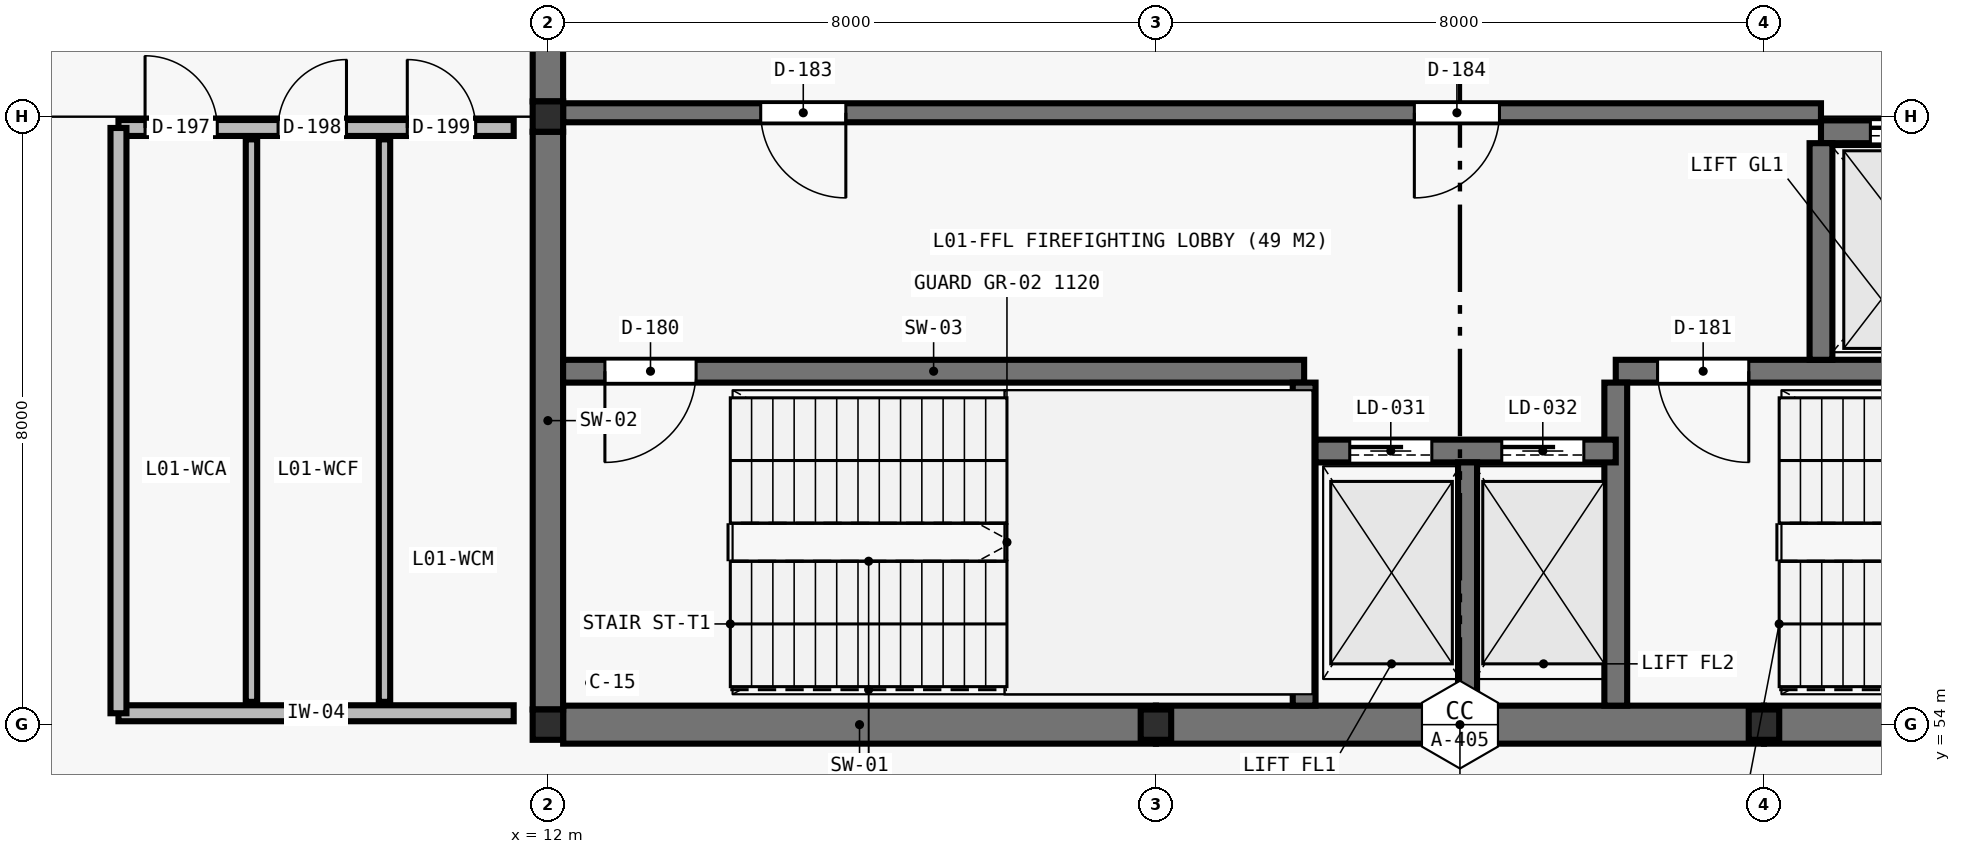
"""IFC4 building model, lengths in metres.
Left out: names, types, materials, properties, quantities, classifications, styles, units other than length and angle.
Written with IfcOpenShell. Run it as: python <this file> out.ifc"""

import sys

from ifc_helpers import new_model, si_unit, direction, frame, frame_2d, origin, origin_2d, place, context, subcontext, project, spatial, rectangle, i_section, extrude, element, fill, save


model = new_model("IFC4")
c1 = context("Model", 3, precision=1e-05, world=origin(), true_north=direction((0.0, 1.0)))
c2 = subcontext(c1, "Body", "Model", "MODEL_VIEW")
j1 = project(units=[si_unit("LENGTHUNIT", "METRE"), si_unit("PLANEANGLEUNIT", "RADIAN")], contexts=[c1])
p1 = place(None, origin())
s1 = spatial("IfcSite", under=j1, at=p1, CompositionType="ELEMENT")
p2 = place(p1, origin())
s2 = spatial("IfcBuilding", under=s1, at=p2, CompositionType="ELEMENT")
p3 = place(p2, frame((0.0, 0.0, 6.3)))
s3 = spatial("IfcBuildingStorey", under=s2, at=p3, CompositionType="ELEMENT", Elevation=6.3)
for number, where, z_axis, x_axis in (
    (1, (12.0, 54.0, 0.0), (0.0, 0.0, 1.0), (1.0, 0.0, 0.0)),
    (2, (12.0, 62.0, 0.0), (0.0, 0.0, 1.0), (1.0, 0.0, 0.0)),
    (3, (20.0, 54.0, 0.0), (0.0, 0.0, 1.0), (1.0, 0.0, 0.0)),
    (4, (28.0, 54.0, 0.0), (0.0, 0.0, 1.0), (1.0, 0.0, 0.0)),
):
    element("IfcColumn", number, at=place(p3, frame(where, z_axis=z_axis, x_axis=x_axis)), inside=s3, PredefinedType="COLUMN", context=c2, shape_type="SweptSolid", body=[
        extrude(i_section(OverallWidth=0.401, OverallDepth=0.399, WebThickness=0.025, FlangeThickness=0.04, at=origin_2d()), origin(), (0.0, 0.0, 1.0), 4.6),
    ])
p4 = place(p3, frame((12.2, 54.0, 0.0), z_axis=(0.0, 0.0, 1.0), x_axis=(1.0, 0.0, 0.0)))
e5 = element("IfcWall", 5, at=p4, inside=s3, PredefinedType="SHEAR", context=c2, shape_type="SweptSolid", body=[
    extrude(rectangle(XDim=7.8, YDim=0.5, at=frame_2d((3.9, 0.0))), origin(), (0.0, 0.0, 1.0), 4.6),
])
p5 = place(p3, frame((20.0, 54.0, 0.0), z_axis=(0.0, 0.0, 1.0), x_axis=(1.0, 0.0, 0.0)))
e6 = element("IfcWall", 6, at=p5, inside=s3, PredefinedType="SHEAR", context=c2, shape_type="SweptSolid", body=[
    extrude(rectangle(XDim=8.0, YDim=0.5, at=frame_2d((4.0, 0.0))), origin(), (0.0, 0.0, 1.0), 4.6),
])
p6 = place(p3, frame((28.0, 54.0, 0.0), z_axis=(0.0, 0.0, 1.0), x_axis=(1.0, 0.0, 0.0)))
e7 = element("IfcWall", 7, at=p6, inside=s3, PredefinedType="SHEAR", context=c2, shape_type="SweptSolid", body=[
    extrude(rectangle(XDim=7.8, YDim=0.5, at=frame_2d((3.9, 0.0))), origin(), (0.0, 0.0, 1.0), 4.6),
])
p7 = place(p3, frame((12.0, 54.199, 0.0), z_axis=(0.0, 0.0, 1.0), x_axis=(0.0, 1.0, 0.0)))
e8 = element("IfcWall", 8, at=p7, inside=s3, PredefinedType="SHEAR", context=c2, shape_type="SweptSolid", body=[
    extrude(rectangle(XDim=7.601, YDim=0.4, at=frame_2d((3.801, 0.0))), origin(), (0.0, 0.0, 1.0), 4.6),
])
p8 = place(p3, frame((12.0, 62.199, 0.0), z_axis=(0.0, 0.0, 1.0), x_axis=(0.0, 1.0, 0.0)))
e9 = element("IfcWall", 9, at=p8, inside=s3, PredefinedType="SHEAR", context=c2, shape_type="SweptSolid", body=[
    extrude(rectangle(XDim=7.601, YDim=0.4, at=frame_2d((3.801, 0.0))), origin(), (0.0, 0.0, 1.0), 4.6),
])
p9 = place(p8, frame((0.7, 0.0, 0.0)))
e10 = element("IfcOpeningElement", 10, at=p9, cuts=e9, PredefinedType="OPENING", context=c2, shape_type="SweptSolid", body=[
    extrude(rectangle(XDim=1.8, YDim=2.2, at=frame_2d((0.9, 1.1))), frame((0.0, 0.21, 0.0), z_axis=(0.0, -1.0, 0.0), x_axis=(1.0, 0.0, 0.0)), (0.0, 0.0, 1.0), 0.42),
])
p10 = place(p3, frame((12.2, 58.65, 0.0), z_axis=(0.0, 0.0, 1.0), x_axis=(1.0, 0.0, 0.0)))
e11 = element("IfcWall", 11, at=p10, inside=s3, PredefinedType="SHEAR", context=c2, shape_type="SweptSolid", body=[
    extrude(rectangle(XDim=9.75, YDim=0.3, at=frame_2d((4.875, 0.0))), origin(), (0.0, 0.0, 1.0), 4.6),
])
p11 = place(p10, frame((0.55, 0.0, 0.0)))
e12 = element("IfcOpeningElement", 12, at=p11, cuts=e11, PredefinedType="OPENING", context=c2, shape_type="SweptSolid", body=[
    extrude(rectangle(XDim=1.2, YDim=2.2, at=frame_2d((0.6, 1.1))), frame((0.0, 0.16, 0.0), z_axis=(0.0, -1.0, 0.0), x_axis=(1.0, 0.0, 0.0)), (0.0, 0.0, 1.0), 0.32),
])
p12 = place(p3, frame((21.95, 54.25, 0.0), z_axis=(0.0, 0.0, 1.0), x_axis=(0.0, 1.0, 0.0)))
e13 = element("IfcWall", 13, at=p12, inside=s3, PredefinedType="SHEAR", context=c2, shape_type="SweptSolid", body=[
    extrude(rectangle(XDim=4.25, YDim=0.3, at=frame_2d((2.125, 0.0))), origin(), (0.0, 0.0, 1.0), 4.6),
])
p13 = place(p3, frame((26.05, 58.65, 0.0), z_axis=(0.0, 0.0, 1.0), x_axis=(1.0, 0.0, 0.0)))
e14 = element("IfcWall", 14, at=p13, inside=s3, PredefinedType="SHEAR", context=c2, shape_type="SweptSolid", body=[
    extrude(rectangle(XDim=9.75, YDim=0.3, at=frame_2d((4.875, 0.0))), origin(), (0.0, 0.0, 1.0), 4.6),
])
p14 = place(p13, frame((0.55, 0.0, 0.0)))
e15 = element("IfcOpeningElement", 15, at=p14, cuts=e14, PredefinedType="OPENING", context=c2, shape_type="SweptSolid", body=[
    extrude(rectangle(XDim=1.2, YDim=2.2, at=frame_2d((0.6, 1.1))), frame((0.0, 0.16, 0.0), z_axis=(0.0, -1.0, 0.0), x_axis=(1.0, 0.0, 0.0)), (0.0, 0.0, 1.0), 0.32),
])
p15 = place(p3, frame((26.05, 54.25, 0.0), z_axis=(0.0, 0.0, 1.0), x_axis=(0.0, 1.0, 0.0)))
e16 = element("IfcWall", 16, at=p15, inside=s3, PredefinedType="SHEAR", context=c2, shape_type="SweptSolid", body=[
    extrude(rectangle(XDim=4.25, YDim=0.3, at=frame_2d((2.125, 0.0))), origin(), (0.0, 0.0, 1.0), 4.6),
])
p16 = place(p3, frame((22.1, 57.6, 0.0), z_axis=(0.0, 0.0, 1.0), x_axis=(1.0, 0.0, 0.0)))
e17 = element("IfcWall", 17, at=p16, inside=s3, PredefinedType="SHEAR", context=c2, shape_type="SweptSolid", body=[
    extrude(rectangle(XDim=3.95, YDim=0.3, at=frame_2d((1.975, 0.0))), origin(), (0.0, 0.0, 1.0), 4.6),
])
p17 = place(p16, frame((0.45, 0.0, 0.0)))
e18 = element("IfcOpeningElement", 18, at=p17, cuts=e17, PredefinedType="OPENING", context=c2, shape_type="SweptSolid", body=[
    extrude(rectangle(XDim=1.08, YDim=2.2, at=frame_2d((0.54, 1.1))), frame((0.0, 0.16, 0.0), z_axis=(0.0, -1.0, 0.0), x_axis=(1.0, 0.0, 0.0)), (0.0, 0.0, 1.0), 0.32),
])
p18 = place(p16, frame((2.45, 0.0, 0.0)))
e19 = element("IfcOpeningElement", 19, at=p18, cuts=e17, PredefinedType="OPENING", context=c2, shape_type="SweptSolid", body=[
    extrude(rectangle(XDim=1.08, YDim=2.2, at=frame_2d((0.54, 1.1))), frame((0.0, 0.16, 0.0), z_axis=(0.0, -1.0, 0.0), x_axis=(1.0, 0.0, 0.0)), (0.0, 0.0, 1.0), 0.32),
])
p19 = place(p3, frame((24.1, 54.25, 0.0), z_axis=(0.0, 0.0, 1.0), x_axis=(0.0, 1.0, 0.0)))
e20 = element("IfcWall", 20, at=p19, inside=s3, PredefinedType="SHEAR", context=c2, shape_type="SweptSolid", body=[
    extrude(rectangle(XDim=3.2, YDim=0.25, at=frame_2d((1.6, 0.0))), origin(), (0.0, 0.0, 1.0), 4.6),
])
p20 = place(p3, frame((28.75, 61.8, 0.0), z_axis=(0.0, 0.0, 1.0), x_axis=(1.0, 0.0, 0.0)))
e21 = element("IfcWall", 21, at=p20, inside=s3, PredefinedType="SHEAR", context=c2, shape_type="SweptSolid", body=[
    extrude(rectangle(XDim=5.0, YDim=0.3, at=frame_2d((2.5, 0.0))), origin(), (0.0, 0.0, 1.0), 4.6),
])
p21 = place(p20, frame((0.65, 0.0, 0.0)))
e22 = element("IfcOpeningElement", 22, at=p21, cuts=e21, PredefinedType="OPENING", context=c2, shape_type="SweptSolid", body=[
    extrude(rectangle(XDim=1.3, YDim=2.3, at=frame_2d((0.65, 1.15))), frame((0.0, 0.16, 0.0), z_axis=(0.0, -1.0, 0.0), x_axis=(1.0, 0.0, 0.0)), (0.0, 0.0, 1.0), 0.32),
])
p22 = place(p20, frame((3.1, 0.0, 0.0)))
e23 = element("IfcOpeningElement", 23, at=p22, cuts=e21, PredefinedType="OPENING", context=c2, shape_type="SweptSolid", body=[
    extrude(rectangle(XDim=1.08, YDim=2.2, at=frame_2d((0.54, 1.1))), frame((0.0, 0.16, 0.0), z_axis=(0.0, -1.0, 0.0), x_axis=(1.0, 0.0, 0.0)), (0.0, 0.0, 1.0), 0.32),
])
p23 = place(p3, frame((28.75, 58.8, 0.0), z_axis=(0.0, 0.0, 1.0), x_axis=(0.0, 1.0, 0.0)))
e24 = element("IfcWall", 24, at=p23, inside=s3, PredefinedType="SHEAR", context=c2, shape_type="SweptSolid", body=[
    extrude(rectangle(XDim=2.85, YDim=0.3, at=frame_2d((1.425, 0.0))), origin(), (0.0, 0.0, 1.0), 4.6),
])
p24 = place(p3, frame((12.2, 62.05, 0.0), z_axis=(0.0, 0.0, 1.0), x_axis=(1.0, 0.0, 0.0)))
e25 = element("IfcWall", 25, at=p24, inside=s3, PredefinedType="SHEAR", context=c2, shape_type="SweptSolid", body=[
    extrude(rectangle(XDim=16.55, YDim=0.25, at=frame_2d((8.275, 0.0))), origin(), (0.0, 0.0, 1.0), 4.6),
])
p25 = place(p24, frame((2.6, 0.0, 0.0)))
e26 = element("IfcOpeningElement", 26, at=p25, cuts=e25, PredefinedType="OPENING", context=c2, shape_type="SweptSolid", body=[
    extrude(rectangle(XDim=1.12, YDim=2.22, at=frame_2d((0.56, 1.11))), frame((0.0, 0.135, 0.0), z_axis=(0.0, -1.0, 0.0), x_axis=(1.0, 0.0, 0.0)), (0.0, 0.0, 1.0), 0.27),
])
p26 = place(p24, frame((11.2, 0.0, 0.0)))
e27 = element("IfcOpeningElement", 27, at=p26, cuts=e25, PredefinedType="OPENING", context=c2, shape_type="SweptSolid", body=[
    extrude(rectangle(XDim=1.12, YDim=2.22, at=frame_2d((0.56, 1.11))), frame((0.0, 0.135, 0.0), z_axis=(0.0, -1.0, 0.0), x_axis=(1.0, 0.0, 0.0)), (0.0, 0.0, 1.0), 0.27),
])
p27 = place(p3, frame((6.35, 61.85, 0.0), z_axis=(0.0, 0.0, 1.0), x_axis=(1.0, 0.0, 0.0)))
e28 = element("IfcWall", 28, at=p27, inside=s3, PredefinedType="PLUMBINGWALL", context=c2, shape_type="SweptSolid", body=[
    extrude(rectangle(XDim=5.2, YDim=0.21, at=frame_2d((2.6, 0.0))), origin(), (0.0, 0.0, 1.0), 3.85),
])
p28 = place(p27, frame((0.35, 0.0, 0.0)))
e29 = element("IfcOpeningElement", 29, at=p28, cuts=e28, PredefinedType="OPENING", context=c2, shape_type="SweptSolid", body=[
    extrude(rectangle(XDim=0.95, YDim=2.1, at=frame_2d((0.475, 1.05))), frame((0.0, 0.115, 0.0), z_axis=(0.0, -1.0, 0.0), x_axis=(1.0, 0.0, 0.0)), (0.0, 0.0, 1.0), 0.23),
])
p29 = place(p27, frame((2.1, 0.0, 0.0)))
e30 = element("IfcOpeningElement", 30, at=p29, cuts=e28, PredefinedType="OPENING", context=c2, shape_type="SweptSolid", body=[
    extrude(rectangle(XDim=0.9, YDim=2.1, at=frame_2d((0.45, 1.05))), frame((0.0, 0.115, 0.0), z_axis=(0.0, -1.0, 0.0), x_axis=(1.0, 0.0, 0.0)), (0.0, 0.0, 1.0), 0.23),
])
p30 = place(p27, frame((3.8, 0.0, 0.0)))
e31 = element("IfcOpeningElement", 31, at=p30, cuts=e28, PredefinedType="OPENING", context=c2, shape_type="SweptSolid", body=[
    extrude(rectangle(XDim=0.9, YDim=2.1, at=frame_2d((0.45, 1.05))), frame((0.0, 0.115, 0.0), z_axis=(0.0, -1.0, 0.0), x_axis=(1.0, 0.0, 0.0)), (0.0, 0.0, 1.0), 0.23),
])
p31 = place(p3, frame((6.35, 54.15, 0.0), z_axis=(0.0, 0.0, 1.0), x_axis=(1.0, 0.0, 0.0)))
e32 = element("IfcWall", 32, at=p31, inside=s3, PredefinedType="PLUMBINGWALL", context=c2, shape_type="SweptSolid", body=[
    extrude(rectangle(XDim=5.2, YDim=0.21, at=frame_2d((2.6, 0.0))), origin(), (0.0, 0.0, 1.0), 3.85),
])
p32 = place(p3, frame((6.35, 54.15, 0.0), z_axis=(0.0, 0.0, 1.0), x_axis=(0.0, 1.0, 0.0)))
e33 = element("IfcWall", 33, at=p32, inside=s3, PredefinedType="PLUMBINGWALL", context=c2, shape_type="SweptSolid", body=[
    extrude(rectangle(XDim=7.7, YDim=0.21, at=frame_2d((3.85, 0.0))), origin(), (0.0, 0.0, 1.0), 4.6),
])
for number, where, z_axis, x_axis in (
    (34, (8.1, 54.3, 0.0), (0.0, 0.0, 1.0), (0.0, 1.0, 0.0)),
    (35, (9.85, 54.3, 0.0), (0.0, 0.0, 1.0), (0.0, 1.0, 0.0)),
):
    element("IfcWall", number, at=place(p3, frame(where, z_axis=z_axis, x_axis=x_axis)), inside=s3, PredefinedType="PARTITIONING", context=c2, shape_type="SweptSolid", body=[
        extrude(rectangle(XDim=7.4, YDim=0.15, at=frame_2d((3.7, 0.0))), origin(), (0.0, 0.0, 1.0), 4.6),
    ])
p33 = place(p11, frame((1.2, 0.0, 0.0), z_axis=(0.0, 0.0, 1.0), x_axis=(-1.0, 0.0, 0.0)))
e36 = element("IfcDoor", 36, at=p33, inside=s3, OperationType="SINGLE_SWING_RIGHT", PredefinedType="DOOR", context=c2, shape_type="SweptSolid", body=[
    extrude(rectangle(XDim=1.2, YDim=2.2, at=frame_2d((0.6, 1.1))), frame((0.0, 0.025, 0.0), z_axis=(0.0, -1.0, 0.0), x_axis=(1.0, 0.0, 0.0)), (0.0, 0.0, 1.0), 0.05),
])
fill(e12, e36)
p34 = place(p14, frame((1.2, 0.0, 0.0), z_axis=(0.0, 0.0, 1.0), x_axis=(-1.0, 0.0, 0.0)))
e37 = element("IfcDoor", 37, at=p34, inside=s3, OperationType="SINGLE_SWING_LEFT", PredefinedType="DOOR", context=c2, shape_type="SweptSolid", body=[
    extrude(rectangle(XDim=1.2, YDim=2.2, at=frame_2d((0.6, 1.1))), frame((0.0, 0.025, 0.0), z_axis=(0.0, -1.0, 0.0), x_axis=(1.0, 0.0, 0.0)), (0.0, 0.0, 1.0), 0.05),
])
fill(e15, e37)
p35 = place(p17, origin())
e38 = element("IfcDoor", 38, at=p35, inside=s3, OperationType="SLIDING_TO_LEFT", PredefinedType="DOOR", context=c2, shape_type="SweptSolid", body=[
    extrude(rectangle(XDim=1.08, YDim=2.2, at=frame_2d((0.54, 1.1))), frame((0.0, 0.025, 0.0), z_axis=(0.0, -1.0, 0.0), x_axis=(1.0, 0.0, 0.0)), (0.0, 0.0, 1.0), 0.05),
])
fill(e18, e38)
p36 = place(p18, origin())
e39 = element("IfcDoor", 39, at=p36, inside=s3, OperationType="SLIDING_TO_LEFT", PredefinedType="DOOR", context=c2, shape_type="SweptSolid", body=[
    extrude(rectangle(XDim=1.08, YDim=2.2, at=frame_2d((0.54, 1.1))), frame((0.0, 0.025, 0.0), z_axis=(0.0, -1.0, 0.0), x_axis=(1.0, 0.0, 0.0)), (0.0, 0.0, 1.0), 0.05),
])
fill(e19, e39)
p37 = place(p21, origin())
e40 = element("IfcDoor", 40, at=p37, inside=s3, OperationType="SLIDING_TO_LEFT", PredefinedType="DOOR", context=c2, shape_type="SweptSolid", body=[
    extrude(rectangle(XDim=1.3, YDim=2.3, at=frame_2d((0.65, 1.15))), frame((0.0, 0.025, 0.0), z_axis=(0.0, -1.0, 0.0), x_axis=(1.0, 0.0, 0.0)), (0.0, 0.0, 1.0), 0.05),
])
fill(e22, e40)
p38 = place(p25, frame((1.12, 0.0, 0.0), z_axis=(0.0, 0.0, 1.0), x_axis=(-1.0, 0.0, 0.0)))
e41 = element("IfcDoor", 41, at=p38, inside=s3, OperationType="SINGLE_SWING_LEFT", PredefinedType="DOOR", context=c2, shape_type="SweptSolid", body=[
    extrude(rectangle(XDim=1.12, YDim=2.22, at=frame_2d((0.56, 1.11))), frame((0.0, 0.025, 0.0), z_axis=(0.0, -1.0, 0.0), x_axis=(1.0, 0.0, 0.0)), (0.0, 0.0, 1.0), 0.05),
])
fill(e26, e41)
p39 = place(p26, frame((1.12, 0.0, 0.0), z_axis=(0.0, 0.0, 1.0), x_axis=(-1.0, 0.0, 0.0)))
e42 = element("IfcDoor", 42, at=p39, inside=s3, OperationType="SINGLE_SWING_RIGHT", PredefinedType="DOOR", context=c2, shape_type="SweptSolid", body=[
    extrude(rectangle(XDim=1.12, YDim=2.22, at=frame_2d((0.56, 1.11))), frame((0.0, 0.025, 0.0), z_axis=(0.0, -1.0, 0.0), x_axis=(1.0, 0.0, 0.0)), (0.0, 0.0, 1.0), 0.05),
])
fill(e27, e42)
p40 = place(p28, origin())
e43 = element("IfcDoor", 43, at=p40, inside=s3, OperationType="SINGLE_SWING_LEFT", PredefinedType="DOOR", context=c2, shape_type="SweptSolid", body=[
    extrude(rectangle(XDim=0.95, YDim=2.1, at=frame_2d((0.475, 1.05))), frame((0.0, 0.025, 0.0), z_axis=(0.0, -1.0, 0.0), x_axis=(1.0, 0.0, 0.0)), (0.0, 0.0, 1.0), 0.05),
])
fill(e29, e43)
p41 = place(p29, origin())
e44 = element("IfcDoor", 44, at=p41, inside=s3, OperationType="SINGLE_SWING_RIGHT", PredefinedType="DOOR", context=c2, shape_type="SweptSolid", body=[
    extrude(rectangle(XDim=0.9, YDim=2.1, at=frame_2d((0.45, 1.05))), frame((0.0, 0.025, 0.0), z_axis=(0.0, -1.0, 0.0), x_axis=(1.0, 0.0, 0.0)), (0.0, 0.0, 1.0), 0.05),
])
fill(e30, e44)
p42 = place(p30, origin())
e45 = element("IfcDoor", 45, at=p42, inside=s3, OperationType="SINGLE_SWING_LEFT", PredefinedType="DOOR", context=c2, shape_type="SweptSolid", body=[
    extrude(rectangle(XDim=0.9, YDim=2.1, at=frame_2d((0.45, 1.05))), frame((0.0, 0.025, 0.0), z_axis=(0.0, -1.0, 0.0), x_axis=(1.0, 0.0, 0.0)), (0.0, 0.0, 1.0), 0.05),
])
fill(e31, e45)
save(model, sys.argv[1])
